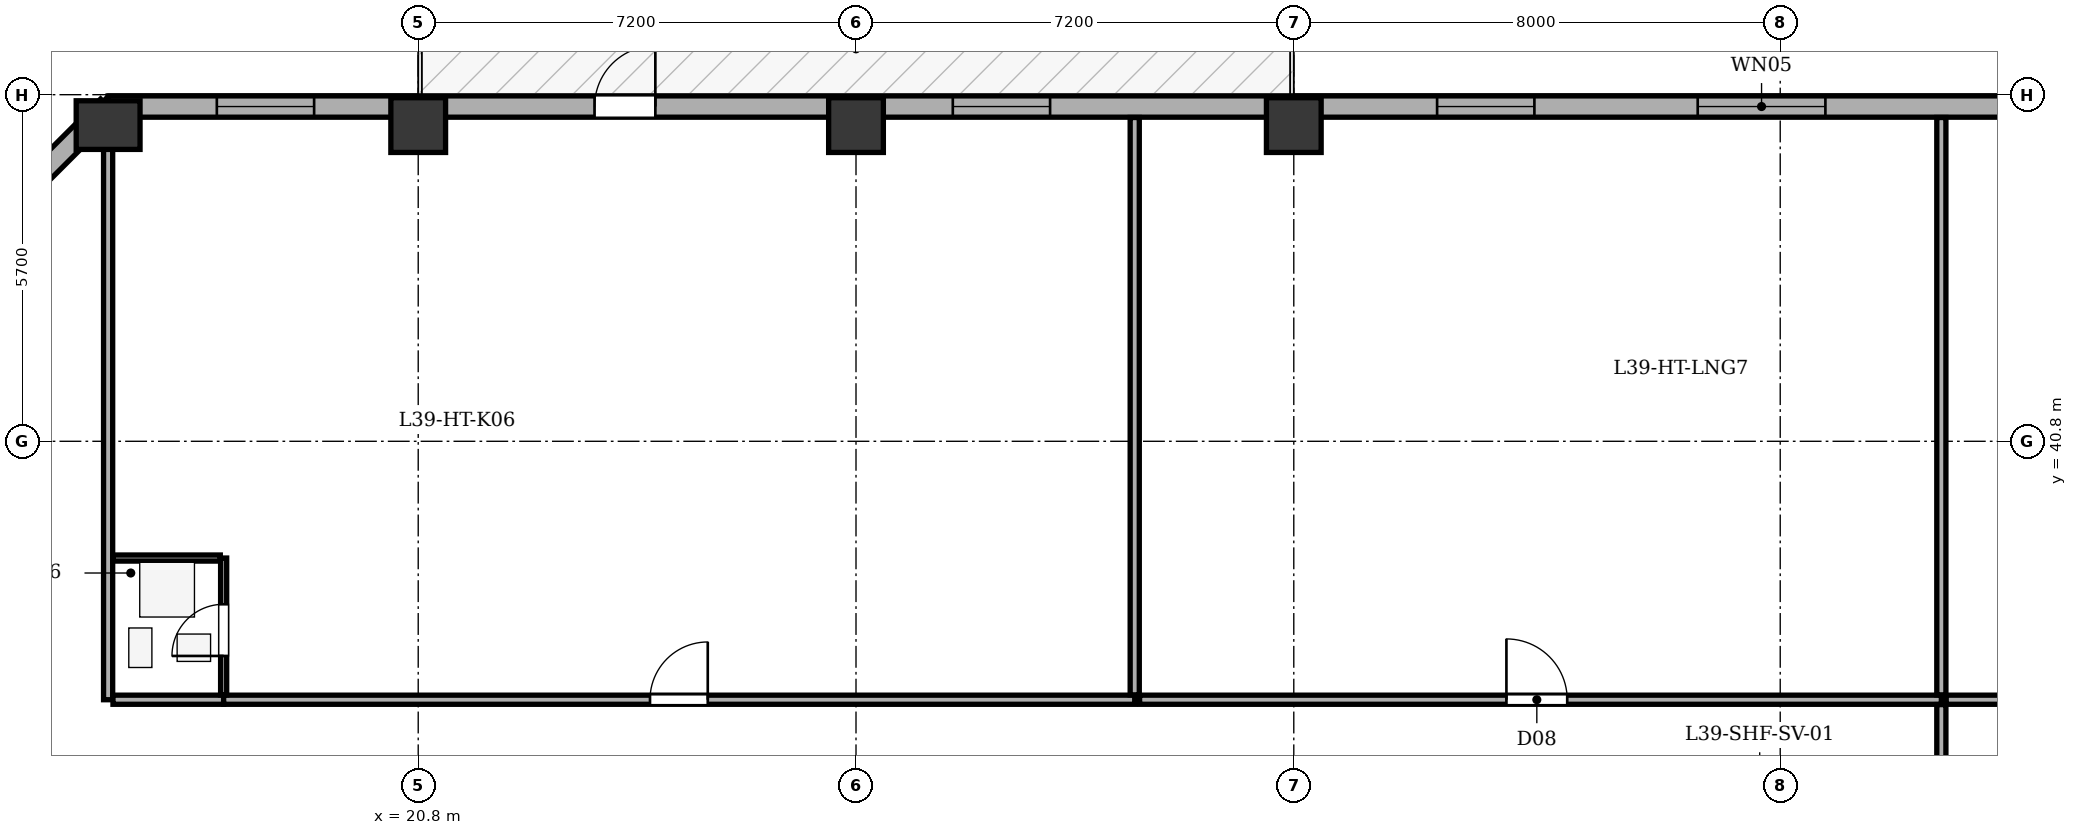
"""IFC4 building model, lengths in metres.
Left out: names, types, materials, properties, quantities, classifications, styles, units other than length and angle.
Written with IfcOpenShell. Run it as: python <this file> out.ifc"""

import sys

from ifc_helpers import new_model, si_unit, direction, frame, frame_2d, origin, origin_2d, place, context, subcontext, project, spatial, rectangle, extrude, element, fill, save


model = new_model("IFC4")
c1 = context("Model", 3, precision=1e-05, world=origin(), true_north=direction((0.0, 1.0)))
c2 = subcontext(c1, "Body", "Model", "MODEL_VIEW")
j1 = project(units=[si_unit("LENGTHUNIT", "METRE"), si_unit("PLANEANGLEUNIT", "RADIAN")], contexts=[c1])
p1 = place(None, origin())
s1 = spatial("IfcSite", under=j1, at=p1, CompositionType="ELEMENT")
p2 = place(p1, origin())
s2 = spatial("IfcBuilding", under=s1, at=p2, CompositionType="ELEMENT")
p3 = place(p2, frame((0.0, 0.0, 155.3)))
s3 = spatial("IfcBuildingStorey", under=s2, at=p3, CompositionType="ELEMENT", Elevation=155.3)
p4 = place(p3, frame((15.7, 46.0, 0.0), z_axis=(0.0, 0.0, 1.0), x_axis=(1.0, 0.0, 0.0)))
e1 = element("IfcColumn", 1, at=p4, inside=s3, PredefinedType="COLUMN", context=c2, shape_type="SweptSolid", body=[
    extrude(rectangle(XDim=0.8, YDim=1.05, at=origin_2d()), origin(), (0.0, 0.0, 1.0), 3.5),
])
for number, where, z_axis, x_axis in (
    (2, (20.8, 46.0, 0.0), (0.0, 0.0, 1.0), (1.0, 0.0, 0.0)),
    (3, (28.0, 46.0, 0.0), (0.0, 0.0, 1.0), (1.0, 0.0, 0.0)),
    (4, (35.2, 46.0, 0.0), (0.0, 0.0, 1.0), (1.0, 0.0, 0.0)),
):
    element("IfcColumn", number, at=place(p3, frame(where, z_axis=z_axis, x_axis=x_axis)), inside=s3, PredefinedType="COLUMN", context=c2, shape_type="SweptSolid", body=[
        extrude(rectangle(XDim=0.9, YDim=0.9, at=origin_2d()), origin(), (0.0, 0.0, 1.0), 3.5),
    ])
p5 = place(p3, frame((10.895, 41.5, 0.0), z_axis=(0.0, 0.0, 1.0), x_axis=(0.707106781187, 0.707106781187, 0.0)))
e5 = element("IfcWall", 5, at=p5, inside=s3, PredefinedType="STANDARD", context=c2, shape_type="SweptSolid", body=[
    extrude(rectangle(XDim=6.795, YDim=0.35, at=frame_2d((3.397, 0.0))), origin(), (0.0, 0.0, 1.0), 2.785),
])
p6 = place(p5, frame((2.698, 0.0, 0.75)))
e6 = element("IfcOpeningElement", 6, at=p6, cuts=e5, PredefinedType="OPENING", context=c2, shape_type="SweptSolid", body=[
    extrude(rectangle(XDim=1.4, YDim=1.65, at=frame_2d((0.7, 0.825))), frame((0.0, 0.185, 0.0), z_axis=(0.0, -1.0, 0.0), x_axis=(1.0, 0.0, 0.0)), (0.0, 0.0, 1.0), 0.37),
])
p7 = place(p3, frame((15.7, 46.305, 0.0), z_axis=(0.0, 0.0, 1.0), x_axis=(1.0, 0.0, 0.0)))
e7 = element("IfcWall", 7, at=p7, inside=s3, PredefinedType="STANDARD", context=c2, shape_type="SweptSolid", body=[
    extrude(rectangle(XDim=35.0, YDim=0.35, at=frame_2d((17.5, 0.0))), origin(), (0.0, 0.0, 1.0), 2.785),
])
p8 = place(p7, frame((8.0, 0.0, 0.0)))
e8 = element("IfcOpeningElement", 8, at=p8, cuts=e7, PredefinedType="OPENING", context=c2, shape_type="SweptSolid", body=[
    extrude(rectangle(XDim=1.0, YDim=2.02, at=frame_2d((0.5, 1.01))), frame((0.0, 0.185, 0.0), z_axis=(0.0, -1.0, 0.0), x_axis=(1.0, 0.0, 0.0)), (0.0, 0.0, 1.0), 0.37),
])
p9 = place(p7, frame((1.788, 0.0, 0.75)))
e9 = element("IfcOpeningElement", 9, at=p9, cuts=e7, PredefinedType="OPENING", context=c2, shape_type="SweptSolid", body=[
    extrude(rectangle(XDim=1.6, YDim=1.75, at=frame_2d((0.8, 0.875))), frame((0.0, 0.185, 0.0), z_axis=(0.0, -1.0, 0.0), x_axis=(1.0, 0.0, 0.0)), (0.0, 0.0, 1.0), 0.37),
])
p10 = place(p7, frame((13.892, 0.0, 0.75)))
e10 = element("IfcOpeningElement", 10, at=p10, cuts=e7, PredefinedType="OPENING", context=c2, shape_type="SweptSolid", body=[
    extrude(rectangle(XDim=1.6, YDim=1.75, at=frame_2d((0.8, 0.875))), frame((0.0, 0.185, 0.0), z_axis=(0.0, -1.0, 0.0), x_axis=(1.0, 0.0, 0.0)), (0.0, 0.0, 1.0), 0.37),
])
p11 = place(p7, frame((21.857, 0.0, 0.75)))
e11 = element("IfcOpeningElement", 11, at=p11, cuts=e7, PredefinedType="OPENING", context=c2, shape_type="SweptSolid", body=[
    extrude(rectangle(XDim=1.6, YDim=1.75, at=frame_2d((0.8, 0.875))), frame((0.0, 0.185, 0.0), z_axis=(0.0, -1.0, 0.0), x_axis=(1.0, 0.0, 0.0)), (0.0, 0.0, 1.0), 0.37),
])
p12 = place(p7, frame((26.143, 0.0, 0.75)))
e12 = element("IfcOpeningElement", 12, at=p12, cuts=e7, PredefinedType="OPENING", context=c2, shape_type="SweptSolid", body=[
    extrude(rectangle(XDim=2.1, YDim=1.75, at=frame_2d((1.05, 0.875))), frame((0.0, 0.185, 0.0), z_axis=(0.0, -1.0, 0.0), x_axis=(1.0, 0.0, 0.0)), (0.0, 0.0, 1.0), 0.37),
])
p13 = place(p7, frame((31.637, 0.0, 0.75)))
e13 = element("IfcOpeningElement", 13, at=p13, cuts=e7, PredefinedType="OPENING", context=c2, shape_type="SweptSolid", body=[
    extrude(rectangle(XDim=1.6, YDim=1.75, at=frame_2d((0.8, 0.875))), frame((0.0, 0.185, 0.0), z_axis=(0.0, -1.0, 0.0), x_axis=(1.0, 0.0, 0.0)), (0.0, 0.0, 1.0), 0.37),
])
p14 = place(p3, frame((15.7, 36.55, 0.0), z_axis=(0.0, 0.0, 1.0), x_axis=(0.0, 1.0, 0.0)))
e14 = element("IfcWall", 14, at=p14, inside=s3, PredefinedType="PARTITIONING", context=c2, shape_type="SweptSolid", body=[
    extrude(rectangle(XDim=9.575, YDim=0.15, at=frame_2d((4.788, 0.0))), origin(), (0.0, 0.0, 1.0), 3.2),
])
p15 = place(p3, frame((15.78, 36.55, 0.0), z_axis=(0.0, 0.0, 1.0), x_axis=(1.0, 0.0, 0.0)))
e15 = element("IfcWall", 15, at=p15, inside=s3, PredefinedType="PARTITIONING", context=c2, shape_type="SweptSolid", body=[
    extrude(rectangle(XDim=1.82, YDim=0.15, at=frame_2d((0.91, 0.0))), origin(), (0.0, 0.0, 1.0), 3.2),
])
p16 = place(p3, frame((17.6, 36.55, 0.0), z_axis=(0.0, 0.0, 1.0), x_axis=(1.0, 0.0, 0.0)))
e16 = element("IfcWall", 16, at=p16, inside=s3, PredefinedType="PARTITIONING", context=c2, shape_type="SweptSolid", body=[
    extrude(rectangle(XDim=14.984, YDim=0.15, at=frame_2d((7.492, 0.0))), origin(), (0.0, 0.0, 1.0), 3.2),
])
p17 = place(p16, frame((7.012, 0.0, 0.0)))
e17 = element("IfcOpeningElement", 17, at=p17, cuts=e16, PredefinedType="OPENING", context=c2, shape_type="SweptSolid", body=[
    extrude(rectangle(XDim=0.95, YDim=2.1, at=frame_2d((0.475, 1.05))), frame((0.0, 0.085, 0.0), z_axis=(0.0, -1.0, 0.0), x_axis=(1.0, 0.0, 0.0)), (0.0, 0.0, 1.0), 0.17),
])
p18 = place(p3, frame((17.6, 36.63, 0.0), z_axis=(0.0, 0.0, 1.0), x_axis=(0.0, 1.0, 0.0)))
e18 = element("IfcWall", 18, at=p18, inside=s3, PredefinedType="PARTITIONING", context=c2, shape_type="SweptSolid", body=[
    extrude(rectangle(XDim=2.25, YDim=0.1, at=frame_2d((1.125, 0.0))), origin(), (0.0, 0.0, 1.0), 3.2),
])
p19 = place(p18, frame((0.64, 0.0, 0.0)))
e19 = element("IfcOpeningElement", 19, at=p19, cuts=e18, PredefinedType="OPENING", context=c2, shape_type="SweptSolid", body=[
    extrude(rectangle(XDim=0.85, YDim=2.05, at=frame_2d((0.425, 1.025))), frame((0.0, 0.06, 0.0), z_axis=(0.0, -1.0, 0.0), x_axis=(1.0, 0.0, 0.0)), (0.0, 0.0, 1.0), 0.12),
])
p20 = place(p3, frame((15.78, 38.88, 0.0), z_axis=(0.0, 0.0, 1.0), x_axis=(1.0, 0.0, 0.0)))
e20 = element("IfcWall", 20, at=p20, inside=s3, PredefinedType="PARTITIONING", context=c2, shape_type="SweptSolid", body=[
    extrude(rectangle(XDim=1.765, YDim=0.1, at=frame_2d((0.882, 0.0))), origin(), (0.0, 0.0, 1.0), 3.2),
])
p21 = place(p3, frame((32.584, 36.63, 0.0), z_axis=(0.0, 0.0, 1.0), x_axis=(0.0, 1.0, 0.0)))
e21 = element("IfcWall", 21, at=p21, inside=s3, PredefinedType="PARTITIONING", context=c2, shape_type="SweptSolid", body=[
    extrude(rectangle(XDim=9.495, YDim=0.15, at=frame_2d((4.748, 0.0))), origin(), (0.0, 0.0, 1.0), 3.2),
])
p22 = place(p3, frame((32.664, 36.55, 0.0), z_axis=(0.0, 0.0, 1.0), x_axis=(1.0, 0.0, 0.0)))
e22 = element("IfcWall", 22, at=p22, inside=s3, PredefinedType="PARTITIONING", context=c2, shape_type="SweptSolid", body=[
    extrude(rectangle(XDim=13.186, YDim=0.15, at=frame_2d((6.593, 0.0))), origin(), (0.0, 0.0, 1.0), 3.2),
])
p23 = place(p22, frame((6.033, 0.0, 0.0)))
e23 = element("IfcOpeningElement", 23, at=p23, cuts=e22, PredefinedType="OPENING", context=c2, shape_type="SweptSolid", body=[
    extrude(rectangle(XDim=1.0, YDim=2.1, at=frame_2d((0.5, 1.05))), frame((0.0, 0.085, 0.0), z_axis=(0.0, -1.0, 0.0), x_axis=(1.0, 0.0, 0.0)), (0.0, 0.0, 1.0), 0.17),
])
p24 = place(p3, frame((45.85, 36.63, 0.0), z_axis=(0.0, 0.0, 1.0), x_axis=(0.0, 1.0, 0.0)))
e24 = element("IfcWall", 24, at=p24, inside=s3, PredefinedType="PARTITIONING", context=c2, shape_type="SweptSolid", body=[
    extrude(rectangle(XDim=9.495, YDim=0.15, at=frame_2d((4.748, 0.0))), origin(), (0.0, 0.0, 1.0), 3.2),
])
p25 = place(p3, frame((45.93, 36.55, 0.0), z_axis=(0.0, 0.0, 1.0), x_axis=(1.0, 0.0, 0.0)))
e25 = element("IfcWall", 25, at=p25, inside=s3, PredefinedType="PARTITIONING", context=c2, shape_type="SweptSolid", body=[
    extrude(rectangle(XDim=9.395, YDim=0.15, at=frame_2d((4.698, 0.0))), origin(), (0.0, 0.0, 1.0), 3.2),
])
p26 = place(p3, frame((45.85, 30.28, 0.0), z_axis=(0.0, 0.0, 1.0), x_axis=(0.0, 1.0, 0.0)))
e26 = element("IfcWall", 26, at=p26, inside=s3, PredefinedType="PARTITIONING", context=c2, shape_type="SweptSolid", body=[
    extrude(rectangle(XDim=6.19, YDim=0.15, at=frame_2d((3.095, 0.0))), origin(), (0.0, 0.0, 1.0), 3.2),
])
p27 = place(p26, frame((2.615, 0.0, 0.0)))
e27 = element("IfcOpeningElement", 27, at=p27, cuts=e26, PredefinedType="OPENING", context=c2, shape_type="SweptSolid", body=[
    extrude(rectangle(XDim=0.95, YDim=2.1, at=frame_2d((0.475, 1.05))), frame((0.0, 0.085, 0.0), z_axis=(0.0, -1.0, 0.0), x_axis=(1.0, 0.0, 0.0)), (0.0, 0.0, 1.0), 0.17),
])
p28 = place(p8, origin())
e28 = element("IfcDoor", 28, at=p28, inside=s3, OperationType="SINGLE_SWING_RIGHT", PredefinedType="DOOR", context=c2, shape_type="SweptSolid", body=[
    extrude(rectangle(XDim=1.0, YDim=2.02, at=frame_2d((0.5, 1.01))), frame((0.0, 0.025, 0.0), z_axis=(0.0, -1.0, 0.0), x_axis=(1.0, 0.0, 0.0)), (0.0, 0.0, 1.0), 0.05),
])
fill(e8, e28)
p29 = place(p9, origin())
e29 = element("IfcWindow", 29, at=p29, inside=s3, PartitioningType="SINGLE_PANEL", PredefinedType="WINDOW", context=c2, shape_type="SweptSolid", body=[
    extrude(rectangle(XDim=1.6, YDim=1.75, at=frame_2d((0.8, 0.875))), frame((0.0, -0.01, 0.0), z_axis=(0.0, -1.0, 0.0), x_axis=(1.0, 0.0, 0.0)), (0.0, 0.0, 1.0), 0.06),
])
fill(e9, e29)
p30 = place(p10, origin())
e30 = element("IfcWindow", 30, at=p30, inside=s3, PartitioningType="SINGLE_PANEL", PredefinedType="WINDOW", context=c2, shape_type="SweptSolid", body=[
    extrude(rectangle(XDim=1.6, YDim=1.75, at=frame_2d((0.8, 0.875))), frame((0.0, -0.01, 0.0), z_axis=(0.0, -1.0, 0.0), x_axis=(1.0, 0.0, 0.0)), (0.0, 0.0, 1.0), 0.06),
])
fill(e10, e30)
p31 = place(p11, origin())
e31 = element("IfcWindow", 31, at=p31, inside=s3, PartitioningType="SINGLE_PANEL", PredefinedType="WINDOW", context=c2, shape_type="SweptSolid", body=[
    extrude(rectangle(XDim=1.6, YDim=1.75, at=frame_2d((0.8, 0.875))), frame((0.0, -0.01, 0.0), z_axis=(0.0, -1.0, 0.0), x_axis=(1.0, 0.0, 0.0)), (0.0, 0.0, 1.0), 0.06),
])
fill(e11, e31)
p32 = place(p12, origin())
e32 = element("IfcWindow", 32, at=p32, inside=s3, PartitioningType="SINGLE_PANEL", PredefinedType="WINDOW", context=c2, shape_type="SweptSolid", body=[
    extrude(rectangle(XDim=2.1, YDim=1.75, at=frame_2d((1.05, 0.875))), frame((0.0, -0.01, 0.0), z_axis=(0.0, -1.0, 0.0), x_axis=(1.0, 0.0, 0.0)), (0.0, 0.0, 1.0), 0.06),
])
fill(e12, e32)
p33 = place(p19, origin())
e33 = element("IfcDoor", 33, at=p33, inside=s3, OperationType="SINGLE_SWING_LEFT", PredefinedType="DOOR", context=c2, shape_type="SweptSolid", body=[
    extrude(rectangle(XDim=0.85, YDim=2.05, at=frame_2d((0.425, 1.025))), frame((0.0, 0.025, 0.0), z_axis=(0.0, -1.0, 0.0), x_axis=(1.0, 0.0, 0.0)), (0.0, 0.0, 1.0), 0.05),
])
fill(e19, e33)
p34 = place(p17, origin())
e34 = element("IfcDoor", 34, at=p34, inside=s3, OperationType="SINGLE_SWING_RIGHT", PredefinedType="DOOR", context=c2, shape_type="SweptSolid", body=[
    extrude(rectangle(XDim=0.95, YDim=2.1, at=frame_2d((0.475, 1.05))), frame((0.0, 0.025, 0.0), z_axis=(0.0, -1.0, 0.0), x_axis=(1.0, 0.0, 0.0)), (0.0, 0.0, 1.0), 0.05),
])
fill(e17, e34)
p35 = place(p23, origin())
e35 = element("IfcDoor", 35, at=p35, inside=s3, OperationType="SINGLE_SWING_LEFT", PredefinedType="DOOR", context=c2, shape_type="SweptSolid", body=[
    extrude(rectangle(XDim=1.0, YDim=2.1, at=frame_2d((0.5, 1.05))), frame((0.0, 0.025, 0.0), z_axis=(0.0, -1.0, 0.0), x_axis=(1.0, 0.0, 0.0)), (0.0, 0.0, 1.0), 0.05),
])
fill(e23, e35)
save(model, sys.argv[1])
